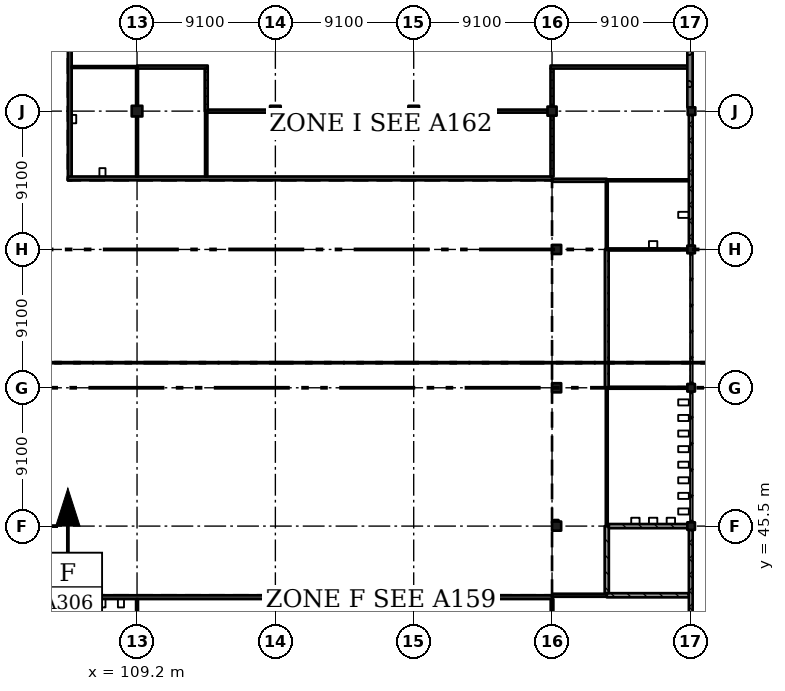
"""IFC4 building model, lengths in metres.
Left out: names, types, materials, properties, quantities, classifications, styles, units other than length and angle.
Written with IfcOpenShell. Run it as: python <this file> out.ifc"""

import sys

from ifc_helpers import new_model, si_unit, direction, frame, frame_2d, origin, origin_2d, place, context, subcontext, project, spatial, rectangle, extrude, element, fill, save


model = new_model("IFC4")
c1 = context("Model", 3, precision=1e-05, world=origin(), true_north=direction((0.0, 1.0)))
c2 = subcontext(c1, "Body", "Model", "MODEL_VIEW")
j1 = project(units=[si_unit("LENGTHUNIT", "METRE"), si_unit("PLANEANGLEUNIT", "RADIAN")], contexts=[c1])
p1 = place(None, origin())
s1 = spatial("IfcSite", under=j1, at=p1, CompositionType="ELEMENT")
p2 = place(p1, origin())
s2 = spatial("IfcBuilding", under=s1, at=p2, CompositionType="ELEMENT")
p3 = place(p2, frame((0.0, 0.0, 20.02)))
s3 = spatial("IfcBuildingStorey", under=s2, at=p3, CompositionType="ELEMENT", Elevation=20.02)
for number, where, z_axis, x_axis in (
    (1, (109.2, 72.8, 0.0), (0.0, 0.0, 1.0), (1.0, 0.0, 0.0)),
    (2, (118.3, 72.8, 0.0), (0.0, 0.0, 1.0), (1.0, 0.0, 0.0)),
    (3, (127.4, 72.8, 0.0), (0.0, 0.0, 1.0), (1.0, 0.0, 0.0)),
):
    element("IfcColumn", number, at=place(p3, frame(where, z_axis=z_axis, x_axis=x_axis)), inside=s3, PredefinedType="COLUMN", context=c2, shape_type="SweptSolid", body=[
        extrude(rectangle(XDim=0.7, YDim=0.7, at=origin_2d()), origin(), (0.0, 0.0, 1.0), 4.55),
    ])
for number, where, z_axis, x_axis in (
    (4, (136.8, 45.5, 0.0), (0.0, 0.0, 1.0), (1.0, 0.0, 0.0)),
    (5, (136.8, 54.6, 0.0), (0.0, 0.0, 1.0), (1.0, 0.0, 0.0)),
    (6, (136.8, 63.7, 0.0), (0.0, 0.0, 1.0), (1.0, 0.0, 0.0)),
    (7, (136.5, 72.8, 0.0), (0.0, 0.0, 1.0), (1.0, 0.0, 0.0)),
):
    element("IfcColumn", number, at=place(p3, frame(where, z_axis=z_axis, x_axis=x_axis)), inside=s3, PredefinedType="COLUMN", context=c2, shape_type="SweptSolid", body=[
        extrude(rectangle(XDim=0.6, YDim=0.6, at=origin_2d()), origin(), (0.0, 0.0, 1.0), 4.55),
    ])
for number, where, z_axis, x_axis in (
    (8, (145.65, 45.5, 0.0), (0.0, 0.0, 1.0), (1.0, 0.0, 0.0)),
    (9, (145.65, 54.6, 0.0), (0.0, 0.0, 1.0), (1.0, 0.0, 0.0)),
    (10, (145.65, 63.7, 0.0), (0.0, 0.0, 1.0), (1.0, 0.0, 0.0)),
    (11, (145.675, 72.8, 0.0), (0.0, 0.0, 1.0), (1.0, 0.0, 0.0)),
):
    element("IfcColumn", number, at=place(p3, frame(where, z_axis=z_axis, x_axis=x_axis)), inside=s3, PredefinedType="COLUMN", context=c2, shape_type="SweptSolid", body=[
        extrude(rectangle(XDim=0.5, YDim=0.5, at=origin_2d()), origin(), (0.0, 0.0, 1.0), 4.55),
    ])
p4 = place(p3, frame((104.775, 68.25, 0.0), z_axis=(0.0, 0.0, 1.0), x_axis=(0.0, 1.0, 0.0)))
e12 = element("IfcWall", 12, at=p4, inside=s3, PredefinedType="SHEAR", context=c2, shape_type="SweptSolid", body=[
    extrude(rectangle(XDim=31.85, YDim=0.25, at=frame_2d((15.925, 0.0))), origin(), (0.0, 0.0, 1.0), 4.55),
])
p5 = place(p3, frame((104.775, 40.95, 0.0), z_axis=(0.0, 0.0, 1.0), x_axis=(0.0, -1.0, 0.0)))
e13 = element("IfcWall", 13, at=p5, inside=s3, PredefinedType="SHEAR", context=c2, shape_type="SweptSolid", body=[
    extrude(rectangle(XDim=31.85, YDim=0.25, at=frame_2d((15.925, 0.0))), origin(), (0.0, 0.0, 1.0), 4.55),
])
for number, where, z_axis, x_axis in (
    (14, (104.65, 40.825, 0.0), (0.0, 0.0, 1.0), (1.0, 0.0, 0.0)),
    (15, (104.65, 68.375, 0.0), (0.0, 0.0, 1.0), (1.0, 0.0, 0.0)),
):
    element("IfcWall", number, at=place(p3, frame(where, z_axis=z_axis, x_axis=x_axis)), inside=s3, PredefinedType="SHEAR", context=c2, shape_type="SweptSolid", body=[
        extrude(rectangle(XDim=31.85, YDim=0.25, at=frame_2d((15.925, 0.0))), origin(), (0.0, 0.0, 1.0), 4.55),
    ])
for number, where, z_axis, x_axis in (
    (16, (145.625, 36.65, 0.0), (0.0, 0.0, 1.0), (0.0, 1.0, 0.0)),
    (17, (145.625, 63.95, 0.0), (0.0, 0.0, 1.0), (0.0, 1.0, 0.0)),
):
    element("IfcWall", number, at=place(p3, frame(where, z_axis=z_axis, x_axis=x_axis)), inside=s3, PredefinedType="SOLIDWALL", context=c2, shape_type="SweptSolid", body=[
        extrude(rectangle(XDim=8.6, YDim=0.25, at=frame_2d((4.3, 0.0))), origin(), (0.0, 0.0, 1.0), 3.5),
    ])
p6 = place(p3, frame((145.575, 73.05, 0.0), z_axis=(0.0, 0.0, 1.0), x_axis=(0.0, 1.0, 0.0)))
e18 = element("IfcWall", 18, at=p6, inside=s3, PredefinedType="SOLIDWALL", context=c2, shape_type="SweptSolid", body=[
    extrude(rectangle(XDim=8.6, YDim=0.35, at=frame_2d((4.3, 0.0))), origin(), (0.0, 0.0, 1.0), 3.5),
])
p7 = place(p3, frame((104.9, 75.7, 0.0), z_axis=(0.0, 0.0, 1.0), x_axis=(1.0, 0.0, 0.0)))
e19 = element("IfcWall", 19, at=p7, inside=s3, PredefinedType="PARTITIONING", context=c2, shape_type="SweptSolid", body=[
    extrude(rectangle(XDim=4.3, YDim=0.125, at=frame_2d((2.15, 0.0))), origin(), (0.0, 0.0, 1.0), 4.25),
])
p8 = place(p7, frame((1.65, 0.0, 0.0)))
e20 = element("IfcOpeningElement", 20, at=p8, cuts=e19, PredefinedType="OPENING", context=c2, shape_type="SweptSolid", body=[
    extrude(rectangle(XDim=1.0, YDim=2.1, at=frame_2d((0.5, 1.05))), frame((0.0, 0.073, 0.0), z_axis=(0.0, -1.0, 0.0), x_axis=(1.0, 0.0, 0.0)), (0.0, 0.0, 1.0), 0.145),
])
for number, where, z_axis, x_axis in (
    (21, (109.2, 36.75, 0.0), (0.0, 0.0, 1.0), (0.0, 1.0, 0.0)),
    (22, (109.2, 68.5, 0.0), (0.0, 0.0, 1.0), (0.0, 1.0, 0.0)),
):
    element("IfcWall", number, at=place(p3, frame(where, z_axis=z_axis, x_axis=x_axis)), inside=s3, PredefinedType="PARTITIONING", context=c2, shape_type="SweptSolid", body=[
        extrude(rectangle(XDim=3.95, YDim=0.125, at=frame_2d((1.975, 0.0))), origin(), (0.0, 0.0, 1.0), 4.25),
    ])
p9 = place(p3, frame((109.2, 73.15, 0.0), z_axis=(0.0, 0.0, 1.0), x_axis=(0.0, 1.0, 0.0)))
e23 = element("IfcWall", 23, at=p9, inside=s3, PredefinedType="PARTITIONING", context=c2, shape_type="SweptSolid", body=[
    extrude(rectangle(XDim=2.45, YDim=0.125, at=frame_2d((1.225, 0.0))), origin(), (0.0, 0.0, 1.0), 3.5),
])
p10 = place(p3, frame((109.2, 75.7, 0.0), z_axis=(0.0, 0.0, 1.0), x_axis=(1.0, 0.0, 0.0)))
e24 = element("IfcWall", 24, at=p10, inside=s3, PredefinedType="PARTITIONING", context=c2, shape_type="SweptSolid", body=[
    extrude(rectangle(XDim=4.65, YDim=0.2, at=frame_2d((2.325, 0.0))), origin(), (0.0, 0.0, 1.0), 4.25),
])
p11 = place(p10, frame((1.85, 0.0, 0.0)))
e25 = element("IfcOpeningElement", 25, at=p11, cuts=e24, PredefinedType="OPENING", context=c2, shape_type="SweptSolid", body=[
    extrude(rectangle(XDim=1.0, YDim=2.1, at=frame_2d((0.5, 1.05))), frame((0.0, 0.11, 0.0), z_axis=(0.0, -1.0, 0.0), x_axis=(1.0, 0.0, 0.0)), (0.0, 0.0, 1.0), 0.22),
])
p12 = place(p3, frame((113.75, 68.5, 0.0), z_axis=(0.0, 0.0, 1.0), x_axis=(0.0, 1.0, 0.0)))
e26 = element("IfcWall", 26, at=p12, inside=s3, PredefinedType="PARTITIONING", context=c2, shape_type="SweptSolid", body=[
    extrude(rectangle(XDim=4.3, YDim=0.15, at=frame_2d((2.15, 0.0))), origin(), (0.0, 0.0, 1.0), 4.25),
])
p13 = place(p3, frame((113.75, 75.6, 0.0), z_axis=(0.0, 0.0, 1.0), x_axis=(0.0, -1.0, 0.0)))
e27 = element("IfcWall", 27, at=p13, inside=s3, PredefinedType="PARTITIONING", context=c2, shape_type="SweptSolid", body=[
    extrude(rectangle(XDim=2.8, YDim=0.2, at=frame_2d((1.4, 0.0))), origin(), (0.0, 0.0, 1.0), 4.25),
])
p14 = place(p3, frame((113.85, 72.8, 0.0), z_axis=(0.0, 0.0, 1.0), x_axis=(1.0, 0.0, 0.0)))
e28 = element("IfcWall", 28, at=p14, inside=s3, PredefinedType="PARTITIONING", context=c2, shape_type="SweptSolid", body=[
    extrude(rectangle(XDim=4.1, YDim=0.2, at=frame_2d((2.05, 0.0))), origin(), (0.0, 0.0, 1.0), 3.55),
])
p15 = place(p3, frame((118.3, 36.75, 0.0), z_axis=(0.0, 0.0, 1.0), x_axis=(0.0, 1.0, 0.0)))
e29 = element("IfcWall", 29, at=p15, inside=s3, PredefinedType="PARTITIONING", context=c2, shape_type="SweptSolid", body=[
    extrude(rectangle(XDim=3.95, YDim=0.175, at=frame_2d((1.975, 0.0))), origin(), (0.0, 0.0, 1.0), 4.25),
])
p16 = place(p3, frame((118.65, 72.8, 0.0), z_axis=(0.0, 0.0, 1.0), x_axis=(1.0, 0.0, 0.0)))
e30 = element("IfcWall", 30, at=p16, inside=s3, PredefinedType="PARTITIONING", context=c2, shape_type="SweptSolid", body=[
    extrude(rectangle(XDim=8.4, YDim=0.2, at=frame_2d((4.2, 0.0))), origin(), (0.0, 0.0, 1.0), 3.55),
])
p17 = place(p3, frame((122.85, 32.988, 0.0), z_axis=(0.0, 0.0, 1.0), x_axis=(0.0, 1.0, 0.0)))
e31 = element("IfcWall", 31, at=p17, inside=s3, PredefinedType="PARTITIONING", context=c2, shape_type="SweptSolid", body=[
    extrude(rectangle(XDim=7.712, YDim=0.175, at=frame_2d((3.856, 0.0))), origin(), (0.0, 0.0, 1.0), 4.25),
])
p18 = place(p3, frame((127.4, 36.75, 0.0), z_axis=(0.0, 0.0, 1.0), x_axis=(0.0, 1.0, 0.0)))
e32 = element("IfcWall", 32, at=p18, inside=s3, PredefinedType="PARTITIONING", context=c2, shape_type="SweptSolid", body=[
    extrude(rectangle(XDim=3.95, YDim=0.175, at=frame_2d((1.975, 0.0))), origin(), (0.0, 0.0, 1.0), 4.25),
])
p19 = place(p3, frame((127.75, 72.8, 0.0), z_axis=(0.0, 0.0, 1.0), x_axis=(1.0, 0.0, 0.0)))
e33 = element("IfcWall", 33, at=p19, inside=s3, PredefinedType="PARTITIONING", context=c2, shape_type="SweptSolid", body=[
    extrude(rectangle(XDim=8.45, YDim=0.2, at=frame_2d((4.225, 0.0))), origin(), (0.0, 0.0, 1.0), 3.5),
])
p20 = place(p19, frame((3.35, 0.0, 0.0)))
e34 = element("IfcOpeningElement", 34, at=p20, cuts=e33, PredefinedType="OPENING", context=c2, shape_type="SweptSolid", body=[
    extrude(rectangle(XDim=1.8, YDim=2.1, at=frame_2d((0.9, 1.05))), frame((0.0, 0.11, 0.0), z_axis=(0.0, -1.0, 0.0), x_axis=(1.0, 0.0, 0.0)), (0.0, 0.0, 1.0), 0.22),
])
p21 = place(p3, frame((131.95, 32.988, 0.0), z_axis=(0.0, 0.0, 1.0), x_axis=(0.0, 1.0, 0.0)))
e35 = element("IfcWall", 35, at=p21, inside=s3, PredefinedType="PARTITIONING", context=c2, shape_type="SweptSolid", body=[
    extrude(rectangle(XDim=7.712, YDim=0.175, at=frame_2d((3.856, 0.0))), origin(), (0.0, 0.0, 1.0), 4.25),
])
p22 = place(p3, frame((136.5, 40.7, 0.0), z_axis=(0.0, 0.0, 1.0), x_axis=(0.0, -1.0, 0.0)))
e36 = element("IfcWall", 36, at=p22, inside=s3, PredefinedType="PARTITIONING", context=c2, shape_type="SweptSolid", body=[
    extrude(rectangle(XDim=4.0, YDim=0.175, at=frame_2d((2.0, 0.0))), origin(), (0.0, 0.0, 1.0), 3.25),
])
p23 = place(p3, frame((136.5, 72.5, 0.0), z_axis=(0.0, 0.0, 1.0), x_axis=(0.0, -1.0, 0.0)))
e37 = element("IfcWall", 37, at=p23, inside=s3, PredefinedType="PARTITIONING", context=c2, shape_type="SweptSolid", body=[
    extrude(rectangle(XDim=4.0, YDim=0.2, at=frame_2d((2.0, 0.0))), origin(), (0.0, 0.0, 1.0), 3.25),
])
p24 = place(p3, frame((136.5, 75.6, 0.0), z_axis=(0.0, 0.0, 1.0), x_axis=(0.0, -1.0, 0.0)))
e38 = element("IfcWall", 38, at=p24, inside=s3, PredefinedType="PARTITIONING", context=c2, shape_type="SweptSolid", body=[
    extrude(rectangle(XDim=2.5, YDim=0.2, at=frame_2d((1.25, 0.0))), origin(), (0.0, 0.0, 1.0), 3.5),
])
p25 = place(p3, frame((136.53, 40.95, 0.0), z_axis=(0.0, 0.0, 1.0), x_axis=(1.0, 0.0, 0.0)))
e39 = element("IfcWall", 39, at=p25, inside=s3, PredefinedType="PARTITIONING", context=c2, shape_type="SweptSolid", body=[
    extrude(rectangle(XDim=3.57, YDim=0.2, at=frame_2d((1.785, 0.0))), origin(), (0.0, 0.0, 1.0), 4.25),
])
p26 = place(p25, frame((0.55, 0.0, 0.0)))
e40 = element("IfcOpeningElement", 40, at=p26, cuts=e39, PredefinedType="OPENING", context=c2, shape_type="SweptSolid", body=[
    extrude(rectangle(XDim=2.4, YDim=2.4, at=frame_2d((1.2, 1.2))), frame((0.0, 0.11, 0.0), z_axis=(0.0, -1.0, 0.0), x_axis=(1.0, 0.0, 0.0)), (0.0, 0.0, 1.0), 0.22),
])
p27 = place(p3, frame((136.925, 45.8, 0.0), z_axis=(0.0, 0.0, 1.0), x_axis=(-1.0, 0.0, 0.0)))
e41 = element("IfcWall", 41, at=p27, inside=s3, PredefinedType="PARTITIONING", context=c2, shape_type="SweptSolid", body=[
    extrude(rectangle(XDim=0.3, YDim=0.2, at=frame_2d((0.15, 0.0))), origin(), (0.0, 0.0, 1.0), 4.25),
])
p28 = place(p3, frame((140.1, 40.95, 0.0), z_axis=(0.0, 0.0, 1.0), x_axis=(1.0, 0.0, 0.0)))
e42 = element("IfcWall", 42, at=p28, inside=s3, PredefinedType="SOLIDWALL", context=c2, shape_type="SweptSolid", body=[
    extrude(rectangle(XDim=5.4, YDim=0.275, at=frame_2d((2.7, 0.0))), origin(), (0.0, 0.0, 1.0), 4.25),
])
p29 = place(p3, frame((140.1, 45.5, 0.0), z_axis=(0.0, 0.0, 1.0), x_axis=(0.0, -1.0, 0.0)))
e43 = element("IfcWall", 43, at=p29, inside=s3, PredefinedType="SOLIDWALL", context=c2, shape_type="SweptSolid", body=[
    extrude(rectangle(XDim=4.413, YDim=0.275, at=frame_2d((2.206, 0.0))), origin(), (0.0, 0.0, 1.0), 4.25),
])
p30 = place(p29, frame((1.65, 0.0, 0.0)))
e44 = element("IfcOpeningElement", 44, at=p30, cuts=e43, PredefinedType="OPENING", context=c2, shape_type="SweptSolid", body=[
    extrude(rectangle(XDim=1.2, YDim=2.4, at=frame_2d((0.6, 1.2))), frame((0.0, 0.147, 0.0), z_axis=(0.0, -1.0, 0.0), x_axis=(1.0, 0.0, 0.0)), (0.0, 0.0, 1.0), 0.295),
])
p31 = place(p3, frame((140.1, 54.6, 0.0), z_axis=(0.0, 0.0, 1.0), x_axis=(0.0, -1.0, 0.0)))
e45 = element("IfcWall", 45, at=p31, inside=s3, PredefinedType="PARTITIONING", context=c2, shape_type="SweptSolid", body=[
    extrude(rectangle(XDim=9.1, YDim=0.125, at=frame_2d((4.55, 0.0))), origin(), (0.0, 0.0, 1.0), 4.25),
])
p32 = place(p31, frame((4.05, 0.0, 0.0)))
e46 = element("IfcOpeningElement", 46, at=p32, cuts=e45, PredefinedType="OPENING", context=c2, shape_type="SweptSolid", body=[
    extrude(rectangle(XDim=0.9, YDim=2.1, at=frame_2d((0.45, 1.05))), frame((0.0, 0.073, 0.0), z_axis=(0.0, -1.0, 0.0), x_axis=(1.0, 0.0, 0.0)), (0.0, 0.0, 1.0), 0.145),
])
p33 = place(p3, frame((140.1, 63.7, 0.0), z_axis=(0.0, 0.0, 1.0), x_axis=(0.0, -1.0, 0.0)))
e47 = element("IfcWall", 47, at=p33, inside=s3, PredefinedType="SOLIDWALL", context=c2, shape_type="SweptSolid", body=[
    extrude(rectangle(XDim=9.1, YDim=0.25, at=frame_2d((4.55, 0.0))), origin(), (0.0, 0.0, 1.0), 4.25),
])
p34 = place(p33, frame((4.05, 0.0, 0.0)))
e48 = element("IfcOpeningElement", 48, at=p34, cuts=e47, PredefinedType="OPENING", context=c2, shape_type="SweptSolid", body=[
    extrude(rectangle(XDim=1.0, YDim=2.1, at=frame_2d((0.5, 1.05))), frame((0.0, 0.135, 0.0), z_axis=(0.0, -1.0, 0.0), x_axis=(1.0, 0.0, 0.0)), (0.0, 0.0, 1.0), 0.27),
])
p35 = place(p3, frame((140.1, 68.15, 0.0), z_axis=(0.0, 0.0, 1.0), x_axis=(0.0, -1.0, 0.0)))
e49 = element("IfcWall", 49, at=p35, inside=s3, PredefinedType="PARTITIONING", context=c2, shape_type="SweptSolid", body=[
    extrude(rectangle(XDim=4.45, YDim=0.125, at=frame_2d((2.225, 0.0))), origin(), (0.0, 0.0, 1.0), 4.25),
])
p36 = place(p35, frame((1.75, 0.0, 0.0)))
e50 = element("IfcOpeningElement", 50, at=p36, cuts=e49, PredefinedType="OPENING", context=c2, shape_type="SweptSolid", body=[
    extrude(rectangle(XDim=1.0, YDim=2.1, at=frame_2d((0.5, 1.05))), frame((0.0, 0.073, 0.0), z_axis=(0.0, -1.0, 0.0), x_axis=(1.0, 0.0, 0.0)), (0.0, 0.0, 1.0), 0.145),
])
p37 = place(p3, frame((140.1, 68.25, 0.0), z_axis=(0.0, 0.0, 1.0), x_axis=(-1.0, 0.0, 0.0)))
e51 = element("IfcWall", 51, at=p37, inside=s3, PredefinedType="PARTITIONING", context=c2, shape_type="SweptSolid", body=[
    extrude(rectangle(XDim=3.57, YDim=0.2, at=frame_2d((1.785, 0.0))), origin(), (0.0, 0.0, 1.0), 4.25),
])
p38 = place(p37, frame((0.55, 0.0, 0.0)))
e52 = element("IfcOpeningElement", 52, at=p38, cuts=e51, PredefinedType="OPENING", context=c2, shape_type="SweptSolid", body=[
    extrude(rectangle(XDim=2.4, YDim=2.4, at=frame_2d((1.2, 1.2))), frame((0.0, 0.11, 0.0), z_axis=(0.0, -1.0, 0.0), x_axis=(1.0, 0.0, 0.0)), (0.0, 0.0, 1.0), 0.22),
])
for number, where, z_axis, x_axis in (
    (53, (140.225, 54.6, 0.0), (0.0, 0.0, 1.0), (1.0, 0.0, 0.0)),
    (54, (140.225, 63.7, 0.0), (0.0, 0.0, 1.0), (1.0, 0.0, 0.0)),
):
    element("IfcWall", number, at=place(p3, frame(where, z_axis=z_axis, x_axis=x_axis)), inside=s3, PredefinedType="PARTITIONING", context=c2, shape_type="SweptSolid", body=[
        extrude(rectangle(XDim=5.175, YDim=0.125, at=frame_2d((2.587, 0.0))), origin(), (0.0, 0.0, 1.0), 3.55),
    ])
p39 = place(p3, frame((140.238, 45.5, 0.0), z_axis=(0.0, 0.0, 1.0), x_axis=(1.0, 0.0, 0.0)))
e55 = element("IfcWall", 55, at=p39, inside=s3, PredefinedType="SOLIDWALL", context=c2, shape_type="SweptSolid", body=[
    extrude(rectangle(XDim=5.162, YDim=0.275, at=frame_2d((2.581, 0.0))), origin(), (0.0, 0.0, 1.0), 3.55),
])
p40 = place(p3, frame((145.4, 75.7, 0.0), z_axis=(0.0, 0.0, 1.0), x_axis=(-1.0, 0.0, 0.0)))
e56 = element("IfcWall", 56, at=p40, inside=s3, PredefinedType="PARTITIONING", context=c2, shape_type="SweptSolid", body=[
    extrude(rectangle(XDim=9.0, YDim=0.2, at=frame_2d((4.5, 0.0))), origin(), (0.0, 0.0, 1.0), 4.25),
])
p41 = place(p40, frame((1.05, 0.0, 0.0)))
e57 = element("IfcOpeningElement", 57, at=p41, cuts=e56, PredefinedType="OPENING", context=c2, shape_type="SweptSolid", body=[
    extrude(rectangle(XDim=2.4, YDim=2.4, at=frame_2d((1.2, 1.2))), frame((0.0, 0.11, 0.0), z_axis=(0.0, -1.0, 0.0), x_axis=(1.0, 0.0, 0.0)), (0.0, 0.0, 1.0), 0.22),
])
p42 = place(p40, frame((5.55, 0.0, 0.0)))
e58 = element("IfcOpeningElement", 58, at=p42, cuts=e56, PredefinedType="OPENING", context=c2, shape_type="SweptSolid", body=[
    extrude(rectangle(XDim=2.4, YDim=2.4, at=frame_2d((1.2, 1.2))), frame((0.0, 0.11, 0.0), z_axis=(0.0, -1.0, 0.0), x_axis=(1.0, 0.0, 0.0)), (0.0, 0.0, 1.0), 0.22),
])
p43 = place(p3, frame((145.5, 68.25, 0.0), z_axis=(0.0, 0.0, 1.0), x_axis=(-1.0, 0.0, 0.0)))
e59 = element("IfcWall", 59, at=p43, inside=s3, PredefinedType="PARTITIONING", context=c2, shape_type="SweptSolid", body=[
    extrude(rectangle(XDim=5.4, YDim=0.125, at=frame_2d((2.7, 0.0))), origin(), (0.0, 0.0, 1.0), 4.25),
])
p44 = place(p20, origin())
e60 = element("IfcDoor", 60, at=p44, inside=s3, OperationType="DOUBLE_DOOR_SINGLE_SWING", PredefinedType="DOOR", context=c2, shape_type="SweptSolid", body=[
    extrude(rectangle(XDim=1.8, YDim=2.1, at=frame_2d((0.9, 1.05))), frame((0.0, 0.025, 0.0), z_axis=(0.0, -1.0, 0.0), x_axis=(1.0, 0.0, 0.0)), (0.0, 0.0, 1.0), 0.05),
])
fill(e34, e60)
p45 = place(p11, origin())
e61 = element("IfcDoor", 61, at=p45, inside=s3, OperationType="SINGLE_SWING_RIGHT", PredefinedType="DOOR", context=c2, shape_type="SweptSolid", body=[
    extrude(rectangle(XDim=1.0, YDim=2.1, at=frame_2d((0.5, 1.05))), frame((0.0, 0.025, 0.0), z_axis=(0.0, -1.0, 0.0), x_axis=(1.0, 0.0, 0.0)), (0.0, 0.0, 1.0), 0.05),
])
fill(e25, e61)
p46 = place(p8, origin())
e62 = element("IfcDoor", 62, at=p46, inside=s3, OperationType="SINGLE_SWING_RIGHT", PredefinedType="DOOR", context=c2, shape_type="SweptSolid", body=[
    extrude(rectangle(XDim=1.0, YDim=2.1, at=frame_2d((0.5, 1.05))), frame((0.0, 0.025, 0.0), z_axis=(0.0, -1.0, 0.0), x_axis=(1.0, 0.0, 0.0)), (0.0, 0.0, 1.0), 0.05),
])
fill(e20, e62)
p47 = place(p30, origin())
e63 = element("IfcDoor", 63, at=p47, inside=s3, OperationType="SINGLE_SWING_LEFT", PredefinedType="DOOR", context=c2, shape_type="SweptSolid", body=[
    extrude(rectangle(XDim=1.2, YDim=2.4, at=frame_2d((0.6, 1.2))), frame((0.0, 0.025, 0.0), z_axis=(0.0, -1.0, 0.0), x_axis=(1.0, 0.0, 0.0)), (0.0, 0.0, 1.0), 0.05),
])
fill(e44, e63)
p48 = place(p32, origin())
e64 = element("IfcDoor", 64, at=p48, inside=s3, OperationType="SINGLE_SWING_RIGHT", PredefinedType="DOOR", context=c2, shape_type="SweptSolid", body=[
    extrude(rectangle(XDim=0.9, YDim=2.1, at=frame_2d((0.45, 1.05))), frame((0.0, 0.025, 0.0), z_axis=(0.0, -1.0, 0.0), x_axis=(1.0, 0.0, 0.0)), (0.0, 0.0, 1.0), 0.05),
])
fill(e46, e64)
p49 = place(p34, origin())
e65 = element("IfcDoor", 65, at=p49, inside=s3, OperationType="SINGLE_SWING_RIGHT", PredefinedType="DOOR", context=c2, shape_type="SweptSolid", body=[
    extrude(rectangle(XDim=1.0, YDim=2.1, at=frame_2d((0.5, 1.05))), frame((0.0, 0.025, 0.0), z_axis=(0.0, -1.0, 0.0), x_axis=(1.0, 0.0, 0.0)), (0.0, 0.0, 1.0), 0.05),
])
fill(e48, e65)
p50 = place(p36, origin())
e66 = element("IfcDoor", 66, at=p50, inside=s3, OperationType="SINGLE_SWING_LEFT", PredefinedType="DOOR", context=c2, shape_type="SweptSolid", body=[
    extrude(rectangle(XDim=1.0, YDim=2.1, at=frame_2d((0.5, 1.05))), frame((0.0, 0.025, 0.0), z_axis=(0.0, -1.0, 0.0), x_axis=(1.0, 0.0, 0.0)), (0.0, 0.0, 1.0), 0.05),
])
fill(e50, e66)
p51 = place(p26, origin())
e67 = element("IfcDoor", 67, at=p51, inside=s3, OperationType="DOUBLE_DOOR_SINGLE_SWING", PredefinedType="DOOR", context=c2, shape_type="SweptSolid", body=[
    extrude(rectangle(XDim=2.4, YDim=2.4, at=frame_2d((1.2, 1.2))), frame((0.0, 0.025, 0.0), z_axis=(0.0, -1.0, 0.0), x_axis=(1.0, 0.0, 0.0)), (0.0, 0.0, 1.0), 0.05),
])
fill(e40, e67)
p52 = place(p41, origin())
e68 = element("IfcDoor", 68, at=p52, inside=s3, OperationType="DOUBLE_DOOR_SINGLE_SWING", PredefinedType="DOOR", context=c2, shape_type="SweptSolid", body=[
    extrude(rectangle(XDim=2.4, YDim=2.4, at=frame_2d((1.2, 1.2))), frame((0.0, 0.025, 0.0), z_axis=(0.0, -1.0, 0.0), x_axis=(1.0, 0.0, 0.0)), (0.0, 0.0, 1.0), 0.05),
])
fill(e57, e68)
p53 = place(p42, origin())
e69 = element("IfcDoor", 69, at=p53, inside=s3, OperationType="DOUBLE_DOOR_SINGLE_SWING", PredefinedType="DOOR", context=c2, shape_type="SweptSolid", body=[
    extrude(rectangle(XDim=2.4, YDim=2.4, at=frame_2d((1.2, 1.2))), frame((0.0, 0.025, 0.0), z_axis=(0.0, -1.0, 0.0), x_axis=(1.0, 0.0, 0.0)), (0.0, 0.0, 1.0), 0.05),
])
fill(e58, e69)
p54 = place(p38, origin())
e70 = element("IfcDoor", 70, at=p54, inside=s3, OperationType="DOUBLE_DOOR_SINGLE_SWING", PredefinedType="DOOR", context=c2, shape_type="SweptSolid", body=[
    extrude(rectangle(XDim=2.4, YDim=2.4, at=frame_2d((1.2, 1.2))), frame((0.0, 0.025, 0.0), z_axis=(0.0, -1.0, 0.0), x_axis=(1.0, 0.0, 0.0)), (0.0, 0.0, 1.0), 0.05),
])
fill(e52, e70)
save(model, sys.argv[1])
